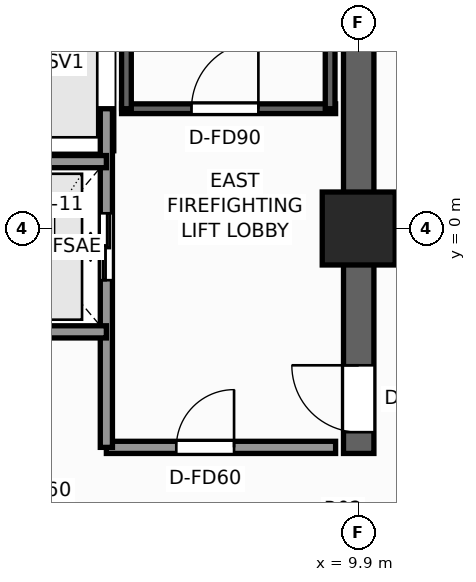
"""IFC4 building model, lengths in metres.
Left out: names, types, materials, properties, quantities, classifications, styles, units other than length and angle.
Written with IfcOpenShell. Run it as: python <this file> out.ifc"""

import sys

from ifc_helpers import new_model, si_unit, direction, frame, frame_2d, origin, origin_2d, place, context, subcontext, project, spatial, rectangle, extrude, element, fill, save


model = new_model("IFC4")
c1 = context("Model", 3, precision=1e-05, world=origin(), true_north=direction((0.0, 1.0)))
c2 = subcontext(c1, "Body", "Model", "MODEL_VIEW")
j1 = project(units=[si_unit("LENGTHUNIT", "METRE"), si_unit("PLANEANGLEUNIT", "RADIAN")], contexts=[c1])
p1 = place(None, origin())
s1 = spatial("IfcSite", under=j1, at=p1, CompositionType="ELEMENT")
p2 = place(p1, origin())
s2 = spatial("IfcBuilding", under=s1, at=p2, CompositionType="ELEMENT")
p3 = place(p2, frame((0.0, 0.0, 111.8)))
s3 = spatial("IfcBuildingStorey", under=s2, at=p3, CompositionType="ELEMENT", Elevation=111.8)
p4 = place(p3, frame((9.9, -3.7, 0.0), z_axis=(0.0, 0.0, 1.0), x_axis=(0.0, 1.0, 0.0)))
e1 = element("IfcWall", 1, at=p4, inside=s3, PredefinedType="SHEAR", context=c2, shape_type="SweptSolid", body=[
    extrude(rectangle(XDim=13.35, YDim=0.5, at=frame_2d((6.675, 0.0))), origin(), (0.0, 0.0, 1.0), 3.3),
])
p5 = place(p4, frame((0.35, 0.0, 0.0)))
e2 = element("IfcOpeningElement", 2, at=p5, cuts=e1, PredefinedType="OPENING", context=c2, shape_type="SweptSolid", body=[
    extrude(rectangle(XDim=1.1, YDim=2.2, at=frame_2d((0.55, 1.1))), frame((0.0, 0.26, 0.0), z_axis=(0.0, -1.0, 0.0), x_axis=(1.0, 0.0, 0.0)), (0.0, 0.0, 1.0), 0.52),
])
p6 = place(p3, frame((9.9, 0.0, 0.0), z_axis=(0.0, 0.0, 1.0), x_axis=(1.0, 0.0, 0.0)))
e3 = element("IfcColumn", 3, at=p6, inside=s3, PredefinedType="COLUMN", context=c2, shape_type="SweptSolid", body=[
    extrude(rectangle(XDim=1.2, YDim=1.2, at=origin_2d()), origin(), (0.0, 0.0, 1.0), 3.3),
])
p7 = place(p3, frame((6.0, 1.97, 0.0), z_axis=(0.0, 0.0, 1.0), x_axis=(1.0, 0.0, 0.0)))
e4 = element("IfcWall", 4, at=p7, inside=s3, PredefinedType="SHEAR", context=c2, shape_type="SweptSolid", body=[
    extrude(rectangle(XDim=3.52, YDim=0.16, at=frame_2d((1.76, 0.0))), origin(), (0.0, 0.0, 1.0), 3.3),
])
p8 = place(p7, frame((1.15, 0.0, 0.0)))
e5 = element("IfcOpeningElement", 5, at=p8, cuts=e4, PredefinedType="OPENING", context=c2, shape_type="SweptSolid", body=[
    extrude(rectangle(XDim=1.1, YDim=2.2, at=frame_2d((0.55, 1.1))), frame((0.0, 0.09, 0.0), z_axis=(0.0, -1.0, 0.0), x_axis=(1.0, 0.0, 0.0)), (0.0, 0.0, 1.0), 0.18),
])
for number, where, z_axis, x_axis in (
    (6, (6.08, 1.97, 0.0), (0.0, 0.0, 1.0), (0.0, 1.0, 0.0)),
    (7, (9.43, 1.97, 0.0), (0.0, 0.0, 1.0), (0.0, 1.0, 0.0)),
):
    element("IfcWall", number, at=place(p3, frame(where, z_axis=z_axis, x_axis=x_axis)), inside=s3, PredefinedType="SHEAR", context=c2, shape_type="SweptSolid", body=[
        extrude(rectangle(XDim=7.56, YDim=0.16, at=frame_2d((3.78, 0.0))), origin(), (0.0, 0.0, 1.0), 3.3),
    ])
p9 = place(p3, frame((5.75, -3.6, 0.0), z_axis=(0.0, 0.0, 1.0), x_axis=(1.0, 0.0, 0.0)))
e8 = element("IfcWall", 8, at=p9, inside=s3, PredefinedType="SOLIDWALL", context=c2, shape_type="SweptSolid", body=[
    extrude(rectangle(XDim=3.77, YDim=0.2, at=frame_2d((1.885, 0.0))), origin(), (0.0, 0.0, 1.0), 3.08),
])
p10 = place(p9, frame((1.15, 0.0, 0.0)))
e9 = element("IfcOpeningElement", 9, at=p10, cuts=e8, PredefinedType="OPENING", context=c2, shape_type="SweptSolid", body=[
    extrude(rectangle(XDim=0.95, YDim=2.06, at=frame_2d((0.475, 1.03))), frame((0.0, 0.11, 0.0), z_axis=(0.0, -1.0, 0.0), x_axis=(1.0, 0.0, 0.0)), (0.0, 0.0, 1.0), 0.22),
])
p11 = place(p3, frame((5.75, -3.6, 0.0), z_axis=(0.0, 0.0, 1.0), x_axis=(0.0, 1.0, 0.0)))
e10 = element("IfcWall", 10, at=p11, inside=s3, PredefinedType="SOLIDWALL", context=c2, shape_type="SweptSolid", body=[
    extrude(rectangle(XDim=5.57, YDim=0.2, at=frame_2d((2.785, 0.0))), origin(), (0.0, 0.0, 1.0), 2.715),
])
p12 = place(p11, frame((2.75, 0.0, 0.0)))
e11 = element("IfcOpeningElement", 11, at=p12, cuts=e10, PredefinedType="OPENING", context=c2, shape_type="SweptSolid", body=[
    extrude(rectangle(XDim=1.1, YDim=2.2, at=frame_2d((0.55, 1.1))), frame((0.0, 0.11, 0.0), z_axis=(0.0, -1.0, 0.0), x_axis=(1.0, 0.0, 0.0)), (0.0, 0.0, 1.0), 0.22),
])
for number, where, z_axis, x_axis in (
    (12, (3.35, -1.7, 0.0), (0.0, 0.0, 1.0), (1.0, 0.0, 0.0)),
    (13, (3.35, 1.1, 0.0), (0.0, 0.0, 1.0), (1.0, 0.0, 0.0)),
):
    element("IfcWall", number, at=place(p3, frame(where, z_axis=z_axis, x_axis=x_axis)), inside=s3, PredefinedType="SOLIDWALL", context=c2, shape_type="SweptSolid", body=[
        extrude(rectangle(XDim=2.4, YDim=0.2, at=frame_2d((1.2, 0.0))), origin(), (0.0, 0.0, 1.0), 3.08),
    ])
p13 = place(p8, origin())
e14 = element("IfcDoor", 14, at=p13, inside=s3, OperationType="SINGLE_SWING_RIGHT", PredefinedType="DOOR", context=c2, shape_type="SweptSolid", body=[
    extrude(rectangle(XDim=1.1, YDim=2.2, at=frame_2d((0.55, 1.1))), frame((0.0, 0.025, 0.0), z_axis=(0.0, -1.0, 0.0), x_axis=(1.0, 0.0, 0.0)), (0.0, 0.0, 1.0), 0.05),
])
fill(e5, e14)
p14 = place(p5, origin())
e15 = element("IfcDoor", 15, at=p14, inside=s3, OperationType="SINGLE_SWING_RIGHT", PredefinedType="DOOR", context=c2, shape_type="SweptSolid", body=[
    extrude(rectangle(XDim=1.1, YDim=2.2, at=frame_2d((0.55, 1.1))), frame((0.0, 0.025, 0.0), z_axis=(0.0, -1.0, 0.0), x_axis=(1.0, 0.0, 0.0)), (0.0, 0.0, 1.0), 0.05),
])
fill(e2, e15)
p15 = place(p12, origin())
e16 = element("IfcDoor", 16, at=p15, inside=s3, OperationType="DOUBLE_DOOR_SLIDING", PredefinedType="DOOR", context=c2, shape_type="SweptSolid", body=[
    extrude(rectangle(XDim=1.1, YDim=2.2, at=frame_2d((0.55, 1.1))), frame((0.0, 0.025, 0.0), z_axis=(0.0, -1.0, 0.0), x_axis=(1.0, 0.0, 0.0)), (0.0, 0.0, 1.0), 0.05),
])
fill(e11, e16)
p16 = place(p10, origin())
e17 = element("IfcDoor", 17, at=p16, inside=s3, OperationType="SINGLE_SWING_RIGHT", PredefinedType="DOOR", context=c2, shape_type="SweptSolid", body=[
    extrude(rectangle(XDim=0.95, YDim=2.06, at=frame_2d((0.475, 1.03))), frame((0.0, 0.025, 0.0), z_axis=(0.0, -1.0, 0.0), x_axis=(1.0, 0.0, 0.0)), (0.0, 0.0, 1.0), 0.05),
])
fill(e9, e17)
save(model, sys.argv[1])
